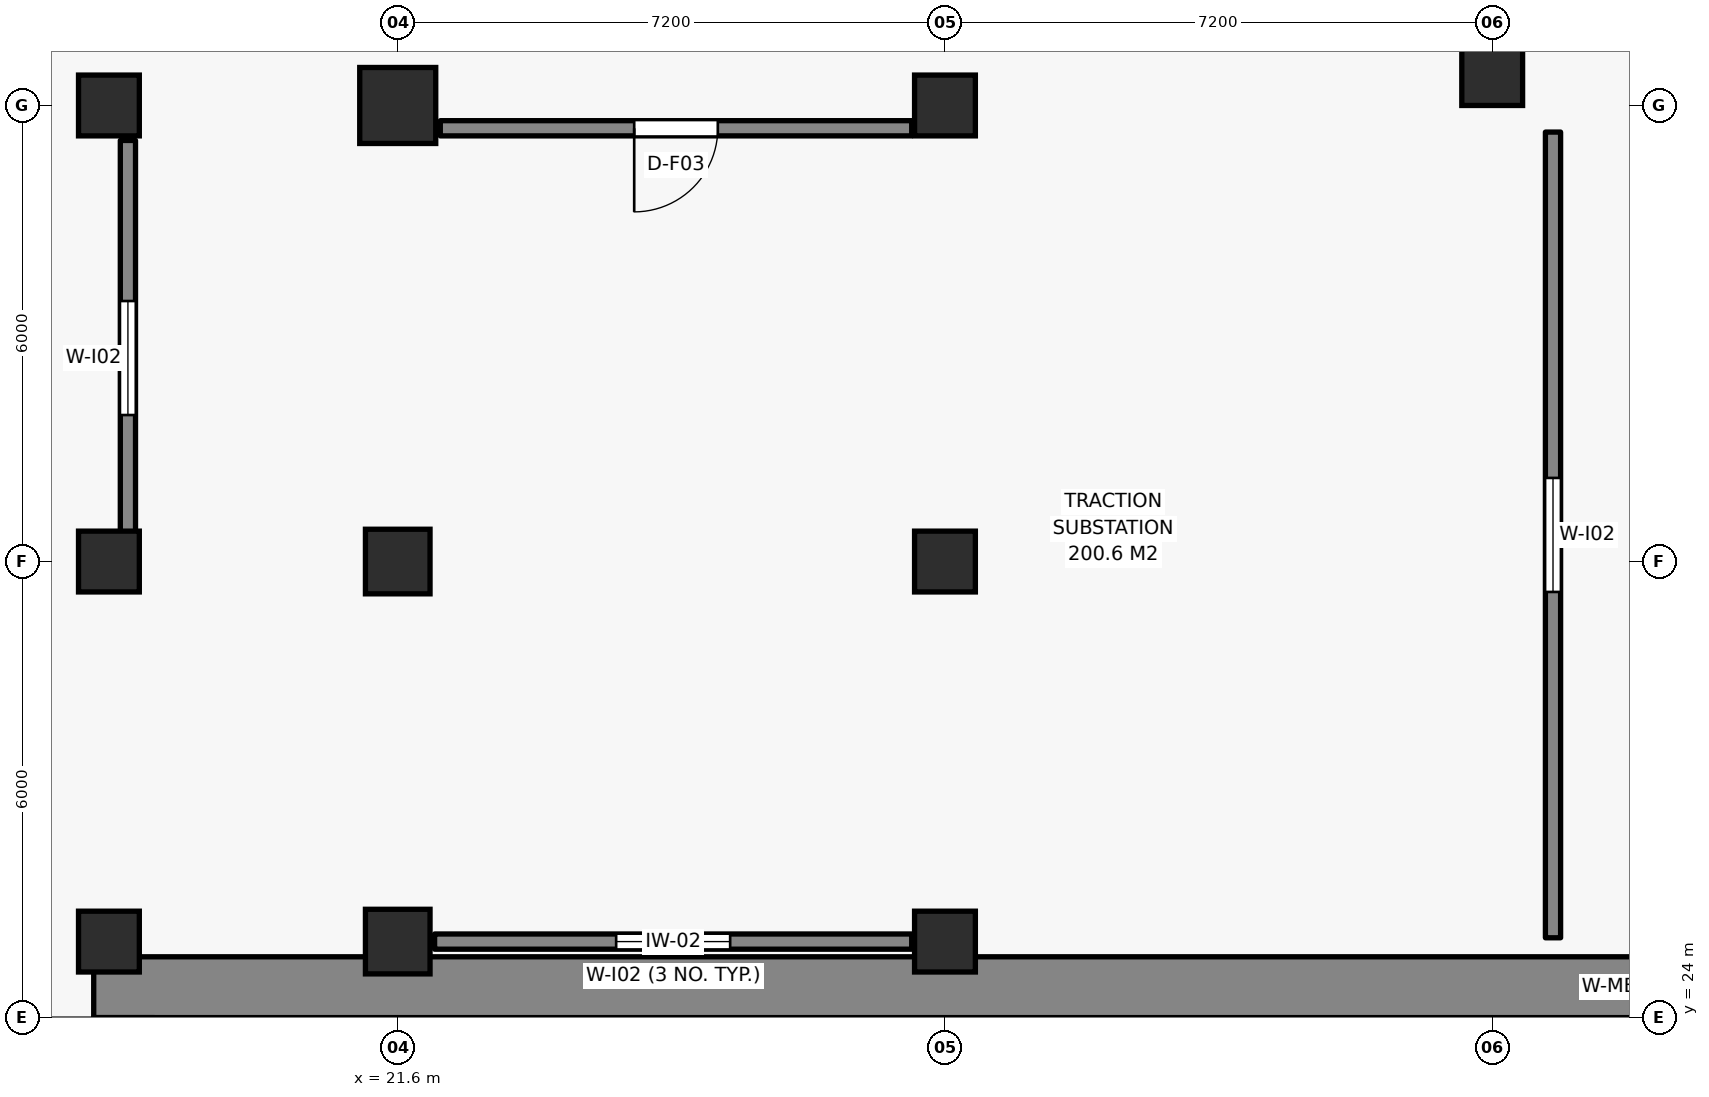
"""IFC4 building model, lengths in metres.
Left out: names, types, materials, properties, quantities, classifications, styles, units other than length and angle.
Written with IfcOpenShell. Run it as: python <this file> out.ifc"""

import sys

from ifc_helpers import new_model, si_unit, direction, frame, frame_2d, origin, origin_2d, place, context, subcontext, project, spatial, rectangle, extrude, element, fill, save


model = new_model("IFC4")
c1 = context("Model", 3, precision=1e-05, world=origin(), true_north=direction((0.0, 1.0)))
c2 = subcontext(c1, "Body", "Model", "MODEL_VIEW")
j1 = project(units=[si_unit("LENGTHUNIT", "METRE"), si_unit("PLANEANGLEUNIT", "RADIAN")], contexts=[c1])
p1 = place(None, origin())
s1 = spatial("IfcSite", under=j1, at=p1, CompositionType="ELEMENT")
p2 = place(p1, origin())
s2 = spatial("IfcBuilding", under=s1, at=p2, CompositionType="ELEMENT")
p3 = place(p2, frame((0.0, 0.0, -7.2)))
s3 = spatial("IfcBuildingStorey", under=s2, at=p3, CompositionType="ELEMENT", Elevation=-7.2)
p4 = place(p3, frame((17.6, 24.4, 0.0), z_axis=(0.0, 0.0, 1.0), x_axis=(1.0, 0.0, 0.0)))
e1 = element("IfcWall", 1, at=p4, inside=s3, PredefinedType="SHEAR", context=c2, shape_type="SweptSolid", body=[
    extrude(rectangle(XDim=126.8, YDim=0.8, at=frame_2d((63.4, 0.0))), origin(), (0.0, 0.0, 1.0), 6.8),
])
p5 = place(p3, frame((18.0, 6.8, 0.0), z_axis=(0.0, 0.0, 1.0), x_axis=(0.0, 1.0, 0.0)))
e2 = element("IfcWall", 2, at=p5, inside=s3, PredefinedType="SHEAR", context=c2, shape_type="SweptSolid", body=[
    extrude(rectangle(XDim=17.2, YDim=0.8, at=frame_2d((8.6, 0.0))), origin(), (0.0, 0.0, 1.0), 6.8),
])
for number, where, z_axis, x_axis in (
    (3, (17.8, 25.0, 0.0), (0.0, 0.0, 1.0), (1.0, 0.0, 0.0)),
    (4, (17.8, 30.0, 0.0), (0.0, 0.0, 1.0), (1.0, 0.0, 0.0)),
    (5, (17.8, 36.0, 0.0), (0.0, 0.0, 1.0), (1.0, 0.0, 0.0)),
):
    element("IfcColumn", number, at=place(p3, frame(where, z_axis=z_axis, x_axis=x_axis)), inside=s3, PredefinedType="COLUMN", context=c2, shape_type="SweptSolid", body=[
        extrude(rectangle(XDim=0.8, YDim=0.8, at=origin_2d()), origin(), (0.0, 0.0, 1.0), 7.2),
    ])
for number, where, z_axis, x_axis in (
    (6, (21.6, 25.0, 0.0), (0.0, 0.0, 1.0), (1.0, 0.0, 0.0)),
    (7, (21.6, 30.0, 0.0), (0.0, 0.0, 1.0), (1.0, 0.0, 0.0)),
):
    element("IfcColumn", number, at=place(p3, frame(where, z_axis=z_axis, x_axis=x_axis)), inside=s3, PredefinedType="COLUMN", context=c2, shape_type="SweptSolid", body=[
        extrude(rectangle(XDim=0.85, YDim=0.85, at=origin_2d()), origin(), (0.0, 0.0, 1.0), 7.2),
    ])
p6 = place(p3, frame((21.6, 36.0, 0.0), z_axis=(0.0, 0.0, 1.0), x_axis=(1.0, 0.0, 0.0)))
e8 = element("IfcColumn", 8, at=p6, inside=s3, PredefinedType="COLUMN", context=c2, shape_type="SweptSolid", body=[
    extrude(rectangle(XDim=1.0, YDim=1.0, at=origin_2d()), origin(), (0.0, 0.0, 1.0), 7.2),
])
for number, where, z_axis, x_axis in (
    (9, (28.8, 25.0, 0.0), (0.0, 0.0, 1.0), (1.0, 0.0, 0.0)),
    (10, (28.8, 30.0, 0.0), (0.0, 0.0, 1.0), (1.0, 0.0, 0.0)),
    (11, (28.8, 36.0, 0.0), (0.0, 0.0, 1.0), (1.0, 0.0, 0.0)),
    (12, (36.0, 36.4, 0.0), (0.0, 0.0, 1.0), (1.0, 0.0, 0.0)),
):
    element("IfcColumn", number, at=place(p3, frame(where, z_axis=z_axis, x_axis=x_axis)), inside=s3, PredefinedType="COLUMN", context=c2, shape_type="SweptSolid", body=[
        extrude(rectangle(XDim=0.8, YDim=0.8, at=origin_2d()), origin(), (0.0, 0.0, 1.0), 7.2),
    ])
p7 = place(p3, frame((22.085, 25.0, 0.0), z_axis=(0.0, 0.0, 1.0), x_axis=(1.0, 0.0, 0.0)))
e13 = element("IfcWall", 13, at=p7, inside=s3, PredefinedType="PARTITIONING", context=c2, shape_type="SweptSolid", body=[
    extrude(rectangle(XDim=6.278, YDim=0.2, at=frame_2d((3.139, 0.0))), origin(), (0.0, 0.0, 1.0), 5.685),
])
p8 = place(p7, frame((2.389, 0.0, 1.05)))
e14 = element("IfcOpeningElement", 14, at=p8, cuts=e13, PredefinedType="OPENING", context=c2, shape_type="SweptSolid", body=[
    extrude(rectangle(XDim=1.5, YDim=1.2, at=frame_2d((0.75, 0.6))), frame((0.0, 0.11, 0.0), z_axis=(0.0, -1.0, 0.0), x_axis=(1.0, 0.0, 0.0)), (0.0, 0.0, 1.0), 0.22),
])
p9 = place(p3, frame((36.8, 25.05, 0.0), z_axis=(0.0, 0.0, 1.0), x_axis=(0.0, 1.0, 0.0)))
e15 = element("IfcWall", 15, at=p9, inside=s3, PredefinedType="PARTITIONING", context=c2, shape_type="SweptSolid", body=[
    extrude(rectangle(XDim=10.6, YDim=0.2, at=frame_2d((5.3, 0.0))), origin(), (0.0, 0.0, 1.0), 6.78),
])
p10 = place(p9, frame((4.55, 0.0, 1.05)))
e16 = element("IfcOpeningElement", 16, at=p10, cuts=e15, PredefinedType="OPENING", context=c2, shape_type="SweptSolid", body=[
    extrude(rectangle(XDim=1.5, YDim=1.2, at=frame_2d((0.75, 0.6))), frame((0.0, 0.11, 0.0), z_axis=(0.0, -1.0, 0.0), x_axis=(1.0, 0.0, 0.0)), (0.0, 0.0, 1.0), 0.22),
])
p11 = place(p3, frame((28.363, 35.7, 0.0), z_axis=(0.0, 0.0, 1.0), x_axis=(-1.0, 0.0, 0.0)))
e17 = element("IfcWall", 17, at=p11, inside=s3, PredefinedType="PARTITIONING", context=c2, shape_type="SweptSolid", body=[
    extrude(rectangle(XDim=6.203, YDim=0.2, at=frame_2d((3.101, 0.0))), origin(), (0.0, 0.0, 1.0), 5.685),
])
p12 = place(p11, frame((2.551, 0.0, 0.0)))
e18 = element("IfcOpeningElement", 18, at=p12, cuts=e17, PredefinedType="OPENING", context=c2, shape_type="SweptSolid", body=[
    extrude(rectangle(XDim=1.1, YDim=2.15, at=frame_2d((0.55, 1.075))), frame((0.0, 0.11, 0.0), z_axis=(0.0, -1.0, 0.0), x_axis=(1.0, 0.0, 0.0)), (0.0, 0.0, 1.0), 0.22),
])
p13 = place(p3, frame((18.05, 35.54, 0.0), z_axis=(0.0, 0.0, 1.0), x_axis=(0.0, -1.0, 0.0)))
e19 = element("IfcWall", 19, at=p13, inside=s3, PredefinedType="PARTITIONING", context=c2, shape_type="SweptSolid", body=[
    extrude(rectangle(XDim=5.725, YDim=0.2, at=frame_2d((2.863, 0.0))), origin(), (0.0, 0.0, 1.0), 5.885),
])
p14 = place(p13, frame((2.113, 0.0, 1.05)))
e20 = element("IfcOpeningElement", 20, at=p14, cuts=e19, PredefinedType="OPENING", context=c2, shape_type="SweptSolid", body=[
    extrude(rectangle(XDim=1.5, YDim=1.2, at=frame_2d((0.75, 0.6))), frame((0.0, 0.11, 0.0), z_axis=(0.0, -1.0, 0.0), x_axis=(1.0, 0.0, 0.0)), (0.0, 0.0, 1.0), 0.22),
])
p15 = place(p12, origin())
e21 = element("IfcDoor", 21, at=p15, inside=s3, OperationType="SINGLE_SWING_RIGHT", PredefinedType="DOOR", context=c2, shape_type="SweptSolid", body=[
    extrude(rectangle(XDim=1.1, YDim=2.15, at=frame_2d((0.55, 1.075))), frame((0.0, 0.025, 0.0), z_axis=(0.0, -1.0, 0.0), x_axis=(1.0, 0.0, 0.0)), (0.0, 0.0, 1.0), 0.05),
])
fill(e18, e21)
p16 = place(p8, origin())
e22 = element("IfcWindow", 22, at=p16, inside=s3, PartitioningType="SINGLE_PANEL", PredefinedType="WINDOW", context=c2, shape_type="SweptSolid", body=[
    extrude(rectangle(XDim=1.5, YDim=1.2, at=frame_2d((0.75, 0.6))), frame((0.0, 0.03, 0.0), z_axis=(0.0, -1.0, 0.0), x_axis=(1.0, 0.0, 0.0)), (0.0, 0.0, 1.0), 0.06),
])
fill(e14, e22)
p17 = place(p10, origin())
e23 = element("IfcWindow", 23, at=p17, inside=s3, PartitioningType="SINGLE_PANEL", PredefinedType="WINDOW", context=c2, shape_type="SweptSolid", body=[
    extrude(rectangle(XDim=1.5, YDim=1.2, at=frame_2d((0.75, 0.6))), frame((0.0, 0.03, 0.0), z_axis=(0.0, -1.0, 0.0), x_axis=(1.0, 0.0, 0.0)), (0.0, 0.0, 1.0), 0.06),
])
fill(e16, e23)
p18 = place(p14, origin())
e24 = element("IfcWindow", 24, at=p18, inside=s3, PartitioningType="SINGLE_PANEL", PredefinedType="WINDOW", context=c2, shape_type="SweptSolid", body=[
    extrude(rectangle(XDim=1.5, YDim=1.2, at=frame_2d((0.75, 0.6))), frame((0.0, 0.03, 0.0), z_axis=(0.0, -1.0, 0.0), x_axis=(1.0, 0.0, 0.0)), (0.0, 0.0, 1.0), 0.06),
])
fill(e20, e24)
save(model, sys.argv[1])
